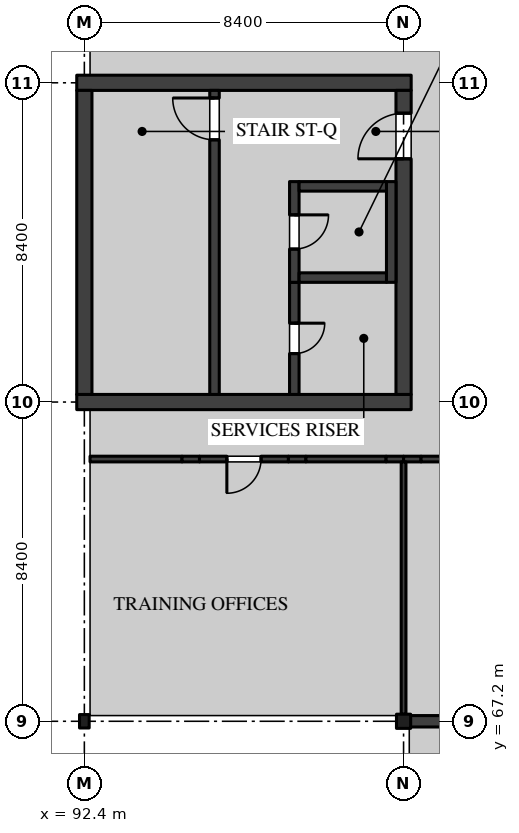
"""IFC4 building model, lengths in metres.
Left out: names, types, materials, properties, quantities, classifications, styles, units other than length and angle.
Written with IfcOpenShell. Run it as: python <this file> out.ifc"""

import sys

from ifc_helpers import new_model, si_unit, direction, frame, frame_2d, origin, origin_2d, place, context, subcontext, project, spatial, rectangle, i_section, extrude, element, fill, save


model = new_model("IFC4")
c1 = context("Model", 3, precision=1e-05, world=origin(), true_north=direction((0.0, 1.0)))
c2 = subcontext(c1, "Body", "Model", "MODEL_VIEW")
j1 = project(units=[si_unit("LENGTHUNIT", "METRE"), si_unit("PLANEANGLEUNIT", "RADIAN")], contexts=[c1])
p1 = place(None, origin())
s1 = spatial("IfcSite", under=j1, at=p1, CompositionType="ELEMENT")
p2 = place(p1, origin())
s2 = spatial("IfcBuilding", under=s1, at=p2, CompositionType="ELEMENT")
p3 = place(p2, frame((0.0, 0.0, 14.4)))
s3 = spatial("IfcBuildingStorey", under=s2, at=p3, CompositionType="ELEMENT", Elevation=14.4)
p4 = place(p3, frame((92.4, 67.2, 0.0), z_axis=(0.0, 0.0, 1.0), x_axis=(1.0, 0.0, 0.0)))
e1 = element("IfcColumn", 1, at=p4, inside=s3, PredefinedType="COLUMN", context=c2, shape_type="SweptSolid", body=[
    extrude(i_section(OverallWidth=0.254, OverallDepth=0.353, WebThickness=0.01, FlangeThickness=0.016, FilletRadius=0.015, at=origin_2d()), origin(), (0.0, 0.0, 1.0), 4.37),
])
p5 = place(p3, frame((100.8, 67.2, 0.0), z_axis=(0.0, 0.0, 1.0), x_axis=(1.0, 0.0, 0.0)))
e2 = element("IfcColumn", 2, at=p5, inside=s3, PredefinedType="COLUMN", context=c2, shape_type="SweptSolid", body=[
    extrude(i_section(OverallWidth=0.373, OverallDepth=0.373, WebThickness=0.016, FlangeThickness=0.026, FilletRadius=0.015, at=origin_2d()), origin(), (0.0, 0.0, 1.0), 4.37),
])
for number, where, z_axis, x_axis in (
    (3, (92.2, 75.6, 0.0), (0.0, 0.0, 1.0), (1.0, 0.0, 0.0)),
    (4, (92.2, 84.0, 0.0), (0.0, 0.0, 1.0), (1.0, 0.0, 0.0)),
):
    element("IfcWall", number, at=place(p3, frame(where, z_axis=z_axis, x_axis=x_axis)), inside=s3, PredefinedType="SHEAR", context=c2, shape_type="SweptSolid", body=[
        extrude(rectangle(XDim=8.8, YDim=0.4, at=frame_2d((4.4, 0.0))), origin(), (0.0, 0.0, 1.0), 4.37),
    ])
p6 = place(p3, frame((92.4, 75.8, 0.0), z_axis=(0.0, 0.0, 1.0), x_axis=(0.0, 1.0, 0.0)))
e5 = element("IfcWall", 5, at=p6, inside=s3, PredefinedType="SHEAR", context=c2, shape_type="SweptSolid", body=[
    extrude(rectangle(XDim=8.0, YDim=0.4, at=frame_2d((4.0, 0.0))), origin(), (0.0, 0.0, 1.0), 4.37),
])
p7 = place(p3, frame((100.8, 75.8, 0.0), z_axis=(0.0, 0.0, 1.0), x_axis=(0.0, 1.0, 0.0)))
e6 = element("IfcWall", 6, at=p7, inside=s3, PredefinedType="SHEAR", context=c2, shape_type="SweptSolid", body=[
    extrude(rectangle(XDim=8.0, YDim=0.4, at=frame_2d((4.0, 0.0))), origin(), (0.0, 0.0, 1.0), 4.37),
])
p8 = place(p7, frame((6.2, 0.0, 0.0)))
e7 = element("IfcOpeningElement", 7, at=p8, cuts=e6, PredefinedType="OPENING", context=c2, shape_type="SweptSolid", body=[
    extrude(rectangle(XDim=1.2, YDim=2.1, at=frame_2d((0.6, 1.05))), frame((0.0, 0.21, 0.0), z_axis=(0.0, -1.0, 0.0), x_axis=(1.0, 0.0, 0.0)), (0.0, 0.0, 1.0), 0.42),
])
p9 = place(p3, frame((95.825, 83.8, 0.0), z_axis=(0.0, 0.0, 1.0), x_axis=(0.0, -1.0, 0.0)))
e8 = element("IfcWall", 8, at=p9, inside=s3, PredefinedType="SOLIDWALL", context=c2, shape_type="SweptSolid", body=[
    extrude(rectangle(XDim=8.0, YDim=0.25, at=frame_2d((4.0, 0.0))), origin(), (0.0, 0.0, 1.0), 4.37),
])
p10 = place(p9, frame((0.2, 0.0, 0.0)))
e9 = element("IfcOpeningElement", 9, at=p10, cuts=e8, PredefinedType="OPENING", context=c2, shape_type="SweptSolid", body=[
    extrude(rectangle(XDim=1.1, YDim=2.1, at=frame_2d((0.55, 1.05))), frame((0.0, 0.135, 0.0), z_axis=(0.0, -1.0, 0.0), x_axis=(1.0, 0.0, 0.0)), (0.0, 0.0, 1.0), 0.27),
])
p11 = place(p3, frame((97.925, 78.75, 0.0), z_axis=(0.0, 0.0, 1.0), x_axis=(0.0, -1.0, 0.0)))
e10 = element("IfcWall", 10, at=p11, inside=s3, PredefinedType="SOLIDWALL", context=c2, shape_type="SweptSolid", body=[
    extrude(rectangle(XDim=2.95, YDim=0.25, at=frame_2d((1.475, 0.0))), origin(), (0.0, 0.0, 1.0), 4.37),
])
p12 = place(p11, frame((1.075, 0.0, 0.0)))
e11 = element("IfcOpeningElement", 11, at=p12, cuts=e10, PredefinedType="OPENING", context=c2, shape_type="SweptSolid", body=[
    extrude(rectangle(XDim=0.8, YDim=2.1, at=frame_2d((0.4, 1.05))), frame((0.0, 0.135, 0.0), z_axis=(0.0, -1.0, 0.0), x_axis=(1.0, 0.0, 0.0)), (0.0, 0.0, 1.0), 0.27),
])
p13 = place(p3, frame((97.925, 81.4, 0.0), z_axis=(0.0, 0.0, 1.0), x_axis=(0.0, -1.0, 0.0)))
e12 = element("IfcWall", 12, at=p13, inside=s3, PredefinedType="SOLIDWALL", context=c2, shape_type="SweptSolid", body=[
    extrude(rectangle(XDim=2.65, YDim=0.25, at=frame_2d((1.325, 0.0))), origin(), (0.0, 0.0, 1.0), 4.37),
])
p14 = place(p13, frame((0.875, 0.0, 0.0)))
e13 = element("IfcOpeningElement", 13, at=p14, cuts=e12, PredefinedType="OPENING", context=c2, shape_type="SweptSolid", body=[
    extrude(rectangle(XDim=0.9, YDim=2.1, at=frame_2d((0.45, 1.05))), frame((0.0, 0.135, 0.0), z_axis=(0.0, -1.0, 0.0), x_axis=(1.0, 0.0, 0.0)), (0.0, 0.0, 1.0), 0.27),
])
p15 = place(p3, frame((100.475, 81.4, 0.0), z_axis=(0.0, 0.0, 1.0), x_axis=(0.0, -1.0, 0.0)))
e14 = element("IfcWall", 14, at=p15, inside=s3, PredefinedType="SOLIDWALL", context=c2, shape_type="SweptSolid", body=[
    extrude(rectangle(XDim=2.65, YDim=0.25, at=frame_2d((1.325, 0.0))), origin(), (0.0, 0.0, 1.0), 4.37),
])
for number, where, z_axis, x_axis in (
    (15, (98.05, 81.275, 0.0), (0.0, 0.0, 1.0), (1.0, 0.0, 0.0)),
    (16, (98.05, 78.875, 0.0), (0.0, 0.0, 1.0), (1.0, 0.0, 0.0)),
):
    element("IfcWall", number, at=place(p3, frame(where, z_axis=z_axis, x_axis=x_axis)), inside=s3, PredefinedType="SOLIDWALL", context=c2, shape_type="SweptSolid", body=[
        extrude(rectangle(XDim=2.3, YDim=0.25, at=frame_2d((1.15, 0.0))), origin(), (0.0, 0.0, 1.0), 4.37),
    ])
p16 = place(p3, frame((92.55, 74.1, 0.0), z_axis=(0.0, 0.0, 1.0), x_axis=(1.0, 0.0, 0.0)))
e17 = element("IfcWall", 17, at=p16, inside=s3, PredefinedType="PARTITIONING", context=c2, shape_type="SweptSolid", body=[
    extrude(rectangle(XDim=2.42, YDim=0.15, at=frame_2d((1.21, 0.0))), origin(), (0.0, 0.0, 1.0), 4.37),
])
p17 = place(p3, frame((94.97, 74.1, 0.0), z_axis=(0.0, 0.0, 1.0), x_axis=(1.0, 0.0, 0.0)))
e18 = element("IfcWall", 18, at=p17, inside=s3, PredefinedType="PARTITIONING", context=c2, shape_type="SweptSolid", body=[
    extrude(rectangle(XDim=0.46, YDim=0.15, at=frame_2d((0.23, 0.0))), origin(), (0.0, 0.0, 1.0), 3.895),
])
p18 = place(p3, frame((95.43, 74.1, 0.0), z_axis=(0.0, 0.0, 1.0), x_axis=(1.0, 0.0, 0.0)))
e19 = element("IfcWall", 19, at=p18, inside=s3, PredefinedType="PARTITIONING", context=c2, shape_type="SweptSolid", body=[
    extrude(rectangle(XDim=2.34, YDim=0.15, at=frame_2d((1.17, 0.0))), origin(), (0.0, 0.0, 1.0), 4.37),
])
p19 = place(p18, frame((0.72, 0.0, 0.0)))
e20 = element("IfcOpeningElement", 20, at=p19, cuts=e19, PredefinedType="OPENING", context=c2, shape_type="SweptSolid", body=[
    extrude(rectangle(XDim=0.9, YDim=2.1, at=frame_2d((0.45, 1.05))), frame((0.0, 0.085, 0.0), z_axis=(0.0, -1.0, 0.0), x_axis=(1.0, 0.0, 0.0)), (0.0, 0.0, 1.0), 0.17),
])
p20 = place(p3, frame((97.77, 74.1, 0.0), z_axis=(0.0, 0.0, 1.0), x_axis=(1.0, 0.0, 0.0)))
e21 = element("IfcWall", 21, at=p20, inside=s3, PredefinedType="PARTITIONING", context=c2, shape_type="SweptSolid", body=[
    extrude(rectangle(XDim=0.46, YDim=0.15, at=frame_2d((0.23, 0.0))), origin(), (0.0, 0.0, 1.0), 3.895),
])
p21 = place(p3, frame((98.23, 74.1, 0.0), z_axis=(0.0, 0.0, 1.0), x_axis=(1.0, 0.0, 0.0)))
e22 = element("IfcWall", 22, at=p21, inside=s3, PredefinedType="PARTITIONING", context=c2, shape_type="SweptSolid", body=[
    extrude(rectangle(XDim=2.11, YDim=0.15, at=frame_2d((1.055, 0.0))), origin(), (0.0, 0.0, 1.0), 4.37),
])
for number, where, z_axis, x_axis in (
    (23, (100.34, 74.1, 0.0), (0.0, 0.0, 1.0), (1.0, 0.0, 0.0)),
    (24, (100.8, 74.1, 0.0), (0.0, 0.0, 1.0), (1.0, 0.0, 0.0)),
):
    element("IfcWall", number, at=place(p3, frame(where, z_axis=z_axis, x_axis=x_axis)), inside=s3, PredefinedType="PARTITIONING", context=c2, shape_type="SweptSolid", body=[
        extrude(rectangle(XDim=0.46, YDim=0.15, at=frame_2d((0.23, 0.0))), origin(), (0.0, 0.0, 1.0), 3.746),
    ])
p22 = place(p3, frame((101.26, 74.1, 0.0), z_axis=(0.0, 0.0, 1.0), x_axis=(1.0, 0.0, 0.0)))
e25 = element("IfcWall", 25, at=p22, inside=s3, PredefinedType="PARTITIONING", context=c2, shape_type="SweptSolid", body=[
    extrude(rectangle(XDim=2.11, YDim=0.15, at=frame_2d((1.055, 0.0))), origin(), (0.0, 0.0, 1.0), 4.37),
])
p23 = place(p22, frame((0.69, 0.0, 0.0)))
e26 = element("IfcOpeningElement", 26, at=p23, cuts=e25, PredefinedType="OPENING", context=c2, shape_type="SweptSolid", body=[
    extrude(rectangle(XDim=1.2, YDim=2.4, at=frame_2d((0.6, 1.2))), frame((0.0, 0.085, 0.0), z_axis=(0.0, -1.0, 0.0), x_axis=(1.0, 0.0, 0.0)), (0.0, 0.0, 1.0), 0.17),
])
p24 = place(p3, frame((100.8, 67.386, 0.0), z_axis=(0.0, 0.0, 1.0), x_axis=(0.0, 1.0, 0.0)))
e27 = element("IfcWall", 27, at=p24, inside=s3, PredefinedType="PARTITIONING", context=c2, shape_type="SweptSolid", body=[
    extrude(rectangle(XDim=6.639, YDim=0.125, at=frame_2d((3.319, 0.0))), origin(), (0.0, 0.0, 1.0), 3.746),
])
p25 = place(p3, frame((109.0, 67.2, 0.0), z_axis=(0.0, 0.0, 1.0), x_axis=(-1.0, 0.0, 0.0)))
e28 = element("IfcWall", 28, at=p25, inside=s3, PredefinedType="SOLIDWALL", context=c2, shape_type="SweptSolid", body=[
    extrude(rectangle(XDim=8.198, YDim=0.3, at=frame_2d((4.099, 0.0))), origin(), (0.0, 0.0, 1.0), 3.746),
])
p26 = place(p8, origin())
e29 = element("IfcDoor", 29, at=p26, inside=s3, OperationType="SINGLE_SWING_RIGHT", PredefinedType="DOOR", context=c2, shape_type="SweptSolid", body=[
    extrude(rectangle(XDim=1.2, YDim=2.1, at=frame_2d((0.6, 1.05))), frame((0.0, 0.035, 0.0), z_axis=(0.0, -1.0, 0.0), x_axis=(1.0, 0.0, 0.0)), (0.0, 0.0, 1.0), 0.07),
])
fill(e7, e29)
p27 = place(p14, origin())
e30 = element("IfcDoor", 30, at=p27, inside=s3, OperationType="SINGLE_SWING_RIGHT", PredefinedType="DOOR", context=c2, shape_type="SweptSolid", body=[
    extrude(rectangle(XDim=0.9, YDim=2.1, at=frame_2d((0.45, 1.05))), frame((0.0, 0.035, 0.0), z_axis=(0.0, -1.0, 0.0), x_axis=(1.0, 0.0, 0.0)), (0.0, 0.0, 1.0), 0.07),
])
fill(e13, e30)
p28 = place(p12, origin())
e31 = element("IfcDoor", 31, at=p28, inside=s3, OperationType="SINGLE_SWING_RIGHT", PredefinedType="DOOR", context=c2, shape_type="SweptSolid", body=[
    extrude(rectangle(XDim=0.8, YDim=2.1, at=frame_2d((0.4, 1.05))), frame((0.0, 0.035, 0.0), z_axis=(0.0, -1.0, 0.0), x_axis=(1.0, 0.0, 0.0)), (0.0, 0.0, 1.0), 0.07),
])
fill(e11, e31)
p29 = place(p10, frame((1.1, 0.0, 0.0), z_axis=(0.0, 0.0, 1.0), x_axis=(-1.0, 0.0, 0.0)))
e32 = element("IfcDoor", 32, at=p29, inside=s3, OperationType="SINGLE_SWING_LEFT", PredefinedType="DOOR", context=c2, shape_type="SweptSolid", body=[
    extrude(rectangle(XDim=1.1, YDim=2.1, at=frame_2d((0.55, 1.05))), frame((0.0, 0.035, 0.0), z_axis=(0.0, -1.0, 0.0), x_axis=(1.0, 0.0, 0.0)), (0.0, 0.0, 1.0), 0.07),
])
fill(e9, e32)
p30 = place(p19, frame((0.9, 0.0, 0.0), z_axis=(0.0, 0.0, 1.0), x_axis=(-1.0, 0.0, 0.0)))
e33 = element("IfcDoor", 33, at=p30, inside=s3, OperationType="SINGLE_SWING_LEFT", PredefinedType="DOOR", context=c2, shape_type="SweptSolid", body=[
    extrude(rectangle(XDim=0.9, YDim=2.1, at=frame_2d((0.45, 1.05))), frame((0.0, 0.025, 0.0), z_axis=(0.0, -1.0, 0.0), x_axis=(1.0, 0.0, 0.0)), (0.0, 0.0, 1.0), 0.05),
])
fill(e20, e33)
save(model, sys.argv[1])
